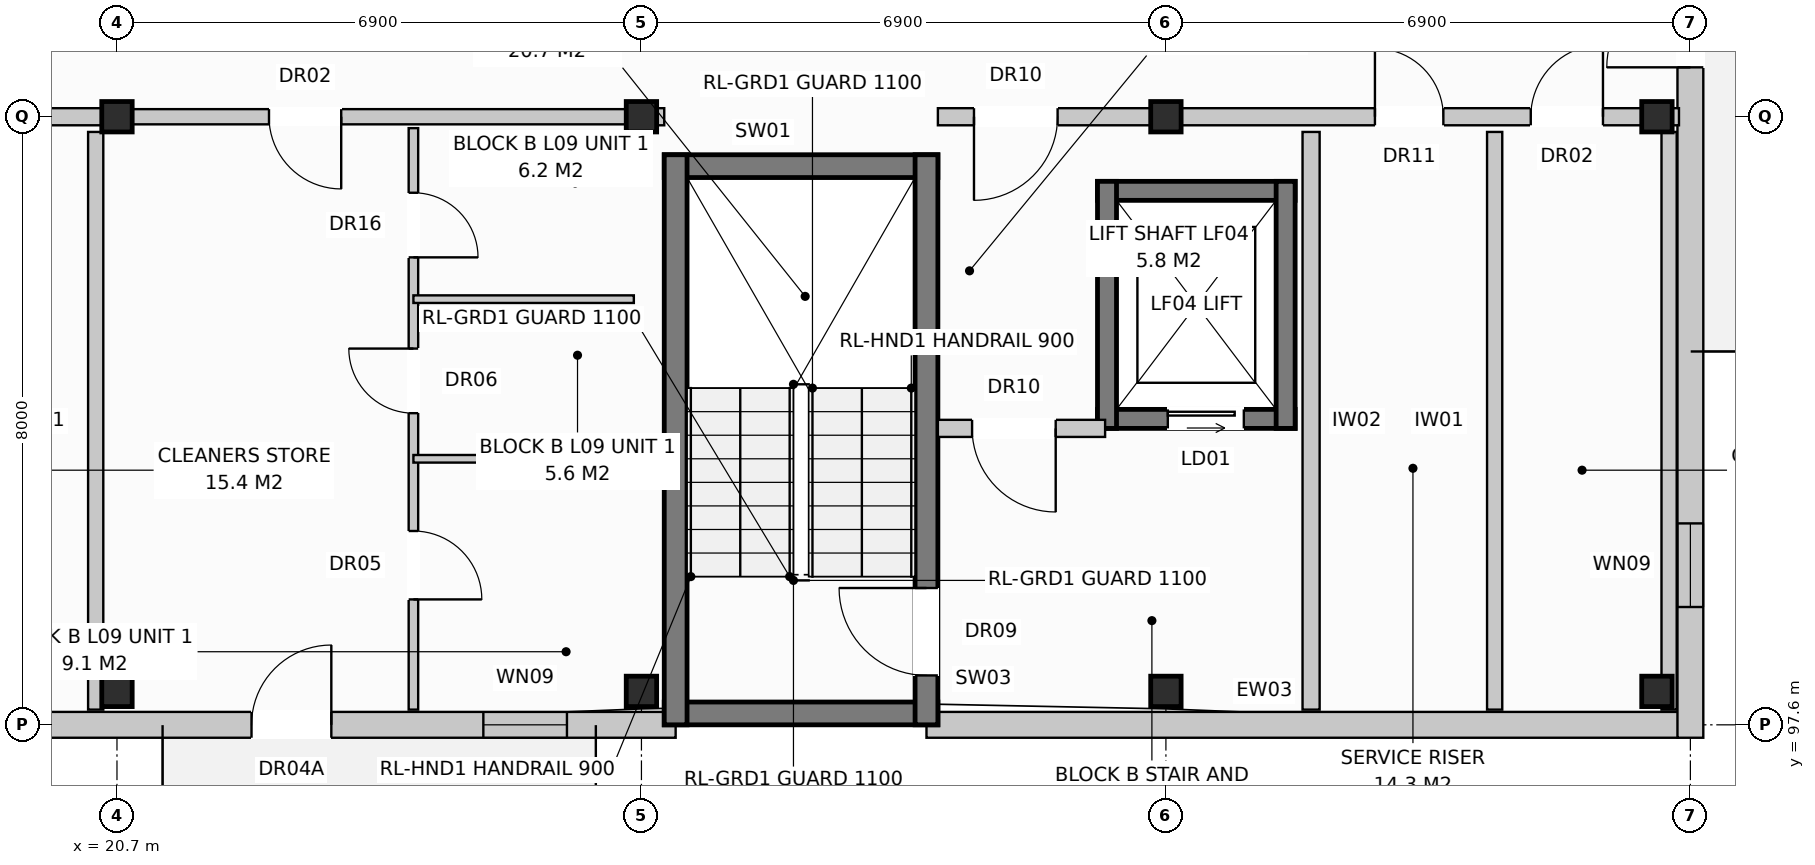
"""IFC4 building model, lengths in metres.
Left out: names, types, materials, properties, quantities, classifications, styles, units other than length and angle.
Written with IfcOpenShell. Run it as: python <this file> out.ifc"""

import sys

from ifc_helpers import new_model, si_unit, direction, frame, frame_2d, origin, origin_with_axes, origin_2d, place, context, subcontext, project, spatial, rectangle, extrude, element, fill, save


model = new_model("IFC4")
c1 = context("Model", 3, precision=1e-05, world=origin(), true_north=direction((0.0, 1.0)))
c2 = subcontext(c1, "Body", "Model", "MODEL_VIEW")
j1 = project(units=[si_unit("LENGTHUNIT", "METRE"), si_unit("PLANEANGLEUNIT", "RADIAN")], contexts=[c1])
p1 = place(None, origin())
s1 = spatial("IfcSite", under=j1, at=p1, CompositionType="ELEMENT")
p2 = place(p1, origin())
s2 = spatial("IfcBuilding", under=s1, at=p2, CompositionType="ELEMENT")
p3 = place(p2, frame((0.0, 0.0, 30.4)))
s3 = spatial("IfcBuildingStorey", under=s2, at=p3, CompositionType="ELEMENT", Elevation=30.4)
for number, where, z_axis, x_axis in (
    (1, (20.7, 98.04, 0.0), (0.0, 0.0, 1.0), (1.0, 0.0, 0.0)),
    (2, (20.7, 105.6, 0.0), (0.0, 0.0, 1.0), (1.0, 0.0, 0.0)),
    (3, (27.6, 98.04, 0.0), (0.0, 0.0, 1.0), (1.0, 0.0, 0.0)),
    (4, (27.6, 105.6, 0.0), (0.0, 0.0, 1.0), (1.0, 0.0, 0.0)),
    (5, (34.5, 98.04, 0.0), (0.0, 0.0, 1.0), (1.0, 0.0, 0.0)),
    (6, (34.5, 105.6, 0.0), (0.0, 0.0, 1.0), (1.0, 0.0, 0.0)),
    (7, (40.96, 98.04, 0.0), (0.0, 0.0, 1.0), (1.0, 0.0, 0.0)),
    (8, (40.96, 105.6, 0.0), (0.0, 0.0, 1.0), (1.0, 0.0, 0.0)),
):
    element("IfcColumn", number, at=place(p3, frame(where, z_axis=z_axis, x_axis=x_axis)), inside=s3, PredefinedType="COLUMN", context=c2, shape_type="SweptSolid", body=[
        extrude(rectangle(XDim=0.4, YDim=0.4, at=origin_2d()), origin(), (0.0, 0.0, 1.0), 3.2),
    ])
p4 = place(p3, frame((10.65, 97.6, 0.0), z_axis=(0.0, 0.0, 1.0), x_axis=(1.0, 0.0, 0.0)))
e9 = element("IfcWall", 9, at=p4, inside=s3, PredefinedType="STANDARD", context=c2, shape_type="SweptSolid", body=[
    extrude(rectangle(XDim=17.4, YDim=0.34, at=frame_2d((8.7, 0.0))), origin(), (0.0, 0.0, 1.0), 2.96),
])
p5 = place(p4, frame((11.82, 0.0, 0.0)))
e10 = element("IfcOpeningElement", 10, at=p5, cuts=e9, PredefinedType="OPENING", context=c2, shape_type="SweptSolid", body=[
    extrude(rectangle(XDim=1.05, YDim=2.12, at=frame_2d((0.525, 1.06))), frame((0.0, 0.182, 0.0), z_axis=(0.0, -1.0, 0.0), x_axis=(1.0, 0.0, 0.0)), (0.0, 0.0, 1.0), 0.364),
])
p6 = place(p4, frame((14.87, 0.0, 0.72)))
e11 = element("IfcOpeningElement", 11, at=p6, cuts=e9, PredefinedType="OPENING", context=c2, shape_type="SweptSolid", body=[
    extrude(rectangle(XDim=1.1, YDim=1.5, at=frame_2d((0.55, 0.75))), frame((0.0, 0.182, 0.0), z_axis=(0.0, -1.0, 0.0), x_axis=(1.0, 0.0, 0.0)), (0.0, 0.0, 1.0), 0.364),
])
p7 = place(p3, frame((31.35, 97.6, 0.0), z_axis=(0.0, 0.0, 1.0), x_axis=(1.0, 0.0, 0.0)))
e12 = element("IfcWall", 12, at=p7, inside=s3, PredefinedType="STANDARD", context=c2, shape_type="SweptSolid", body=[
    extrude(rectangle(XDim=9.89, YDim=0.34, at=frame_2d((4.945, 0.0))), origin(), (0.0, 0.0, 1.0), 2.96),
])
p8 = place(p3, frame((41.4, 97.43, 0.0), z_axis=(0.0, 0.0, 1.0), x_axis=(0.0, 1.0, 0.0)))
e13 = element("IfcWall", 13, at=p8, inside=s3, PredefinedType="STANDARD", context=c2, shape_type="SweptSolid", body=[
    extrude(rectangle(XDim=18.74, YDim=0.34, at=frame_2d((9.37, 0.0))), origin(), (0.0, 0.0, 1.0), 2.96),
])
p9 = place(p8, frame((8.82, 0.0, 0.0)))
e14 = element("IfcOpeningElement", 14, at=p9, cuts=e13, PredefinedType="OPENING", context=c2, shape_type="SweptSolid", body=[
    extrude(rectangle(XDim=1.1, YDim=2.1, at=frame_2d((0.55, 1.05))), frame((0.0, 0.182, 0.0), z_axis=(0.0, -1.0, 0.0), x_axis=(1.0, 0.0, 0.0)), (0.0, 0.0, 1.0), 0.364),
])
p10 = place(p8, frame((1.72, 0.0, 0.72)))
e15 = element("IfcOpeningElement", 15, at=p10, cuts=e13, PredefinedType="OPENING", context=c2, shape_type="SweptSolid", body=[
    extrude(rectangle(XDim=1.1, YDim=1.5, at=frame_2d((0.55, 0.75))), frame((0.0, 0.182, 0.0), z_axis=(0.0, -1.0, 0.0), x_axis=(1.0, 0.0, 0.0)), (0.0, 0.0, 1.0), 0.364),
])
p11 = place(p8, frame((15.92, 0.0, 0.72)))
e16 = element("IfcOpeningElement", 16, at=p11, cuts=e13, PredefinedType="OPENING", context=c2, shape_type="SweptSolid", body=[
    extrude(rectangle(XDim=1.1, YDim=1.5, at=frame_2d((0.55, 0.75))), frame((0.0, 0.182, 0.0), z_axis=(0.0, -1.0, 0.0), x_axis=(1.0, 0.0, 0.0)), (0.0, 0.0, 1.0), 0.364),
])
p12 = place(p3, frame((20.42, 97.8, 0.0), z_axis=(0.0, 0.0, 1.0), x_axis=(0.0, 1.0, 0.0)))
e17 = element("IfcWall", 17, at=p12, inside=s3, PredefinedType="PARTITIONING", context=c2, shape_type="SweptSolid", body=[
    extrude(rectangle(XDim=7.6, YDim=0.2, at=frame_2d((3.8, 0.0))), origin(), (0.0, 0.0, 1.0), 2.96),
])
p13 = place(p3, frame((10.8, 105.6, 0.0), z_axis=(0.0, 0.0, 1.0), x_axis=(1.0, 0.0, 0.0)))
e18 = element("IfcWall", 18, at=p13, inside=s3, PredefinedType="PARTITIONING", context=c2, shape_type="SweptSolid", body=[
    extrude(rectangle(XDim=9.9, YDim=0.225, at=frame_2d((4.95, 0.0))), origin(), (0.0, 0.0, 1.0), 2.4),
])
p14 = place(p13, frame((0.475, 0.0, 0.0)))
e19 = element("IfcOpeningElement", 19, at=p14, cuts=e18, PredefinedType="OPENING", context=c2, shape_type="SweptSolid", body=[
    extrude(rectangle(XDim=1.1, YDim=2.15, at=frame_2d((0.55, 1.075))), frame((0.0, 0.125, 0.0), z_axis=(0.0, -1.0, 0.0), x_axis=(1.0, 0.0, 0.0)), (0.0, 0.0, 1.0), 0.249),
])
p15 = place(p13, frame((5.75, 0.0, 0.0)))
e20 = element("IfcOpeningElement", 20, at=p15, cuts=e18, PredefinedType="OPENING", context=c2, shape_type="SweptSolid", body=[
    extrude(rectangle(XDim=0.9, YDim=2.1, at=frame_2d((0.45, 1.05))), frame((0.0, 0.125, 0.0), z_axis=(0.0, -1.0, 0.0), x_axis=(1.0, 0.0, 0.0)), (0.0, 0.0, 1.0), 0.249),
])
p16 = place(p13, frame((7.8, 0.0, 0.0)))
e21 = element("IfcOpeningElement", 21, at=p16, cuts=e18, PredefinedType="OPENING", context=c2, shape_type="SweptSolid", body=[
    extrude(rectangle(XDim=0.95, YDim=2.15, at=frame_2d((0.475, 1.075))), frame((0.0, 0.125, 0.0), z_axis=(0.0, -1.0, 0.0), x_axis=(1.0, 0.0, 0.0)), (0.0, 0.0, 1.0), 0.249),
])
for number, where, z_axis, x_axis in (
    (22, (27.9, 97.75, 0.0), (0.0, 0.0, 1.0), (1.0, 0.0, 0.0)),
    (23, (27.9, 104.95, 0.0), (0.0, 0.0, 1.0), (1.0, 0.0, 0.0)),
):
    element("IfcWall", number, at=place(p3, frame(where, z_axis=z_axis, x_axis=x_axis)), inside=s3, PredefinedType="SHEAR", context=c2, shape_type="SweptSolid", body=[
        extrude(rectangle(XDim=3.6, YDim=0.3, at=frame_2d((1.8, 0.0))), origin(), (0.0, 0.0, 1.0), 2.96),
    ])
p17 = place(p3, frame((28.05, 97.6, 0.0), z_axis=(0.0, 0.0, 1.0), x_axis=(0.0, 1.0, 0.0)))
e24 = element("IfcWall", 24, at=p17, inside=s3, PredefinedType="SHEAR", context=c2, shape_type="SweptSolid", body=[
    extrude(rectangle(XDim=7.5, YDim=0.3, at=frame_2d((3.75, 0.0))), origin(), (0.0, 0.0, 1.0), 2.96),
])
p18 = place(p3, frame((31.35, 97.6, 0.0), z_axis=(0.0, 0.0, 1.0), x_axis=(0.0, 1.0, 0.0)))
e25 = element("IfcWall", 25, at=p18, inside=s3, PredefinedType="SHEAR", context=c2, shape_type="SweptSolid", body=[
    extrude(rectangle(XDim=7.5, YDim=0.3, at=frame_2d((3.75, 0.0))), origin(), (0.0, 0.0, 1.0), 2.96),
])
p19 = place(p18, frame((0.65, 0.0, 0.0)))
e26 = element("IfcOpeningElement", 26, at=p19, cuts=e25, PredefinedType="OPENING", context=c2, shape_type="SweptSolid", body=[
    extrude(rectangle(XDim=1.15, YDim=2.15, at=frame_2d((0.575, 1.075))), frame((0.0, 0.162, 0.0), z_axis=(0.0, -1.0, 0.0), x_axis=(1.0, 0.0, 0.0)), (0.0, 0.0, 1.0), 0.324),
])
p20 = place(p3, frame((33.6, 101.625, 0.0), z_axis=(0.0, 0.0, 1.0), x_axis=(1.0, 0.0, 0.0)))
e27 = element("IfcWall", 27, at=p20, inside=s3, PredefinedType="SHEAR", context=c2, shape_type="SweptSolid", body=[
    extrude(rectangle(XDim=2.6, YDim=0.25, at=frame_2d((1.3, 0.0))), origin(), (0.0, 0.0, 1.0), 2.96),
])
p21 = place(p20, frame((0.925, 0.0, 0.0)))
e28 = element("IfcOpeningElement", 28, at=p21, cuts=e27, PredefinedType="OPENING", context=c2, shape_type="SweptSolid", body=[
    extrude(rectangle(XDim=1.0, YDim=2.1, at=frame_2d((0.5, 1.05))), frame((0.0, 0.137, 0.0), z_axis=(0.0, -1.0, 0.0), x_axis=(1.0, 0.0, 0.0)), (0.0, 0.0, 1.0), 0.274),
])
p22 = place(p3, frame((33.6, 104.625, 0.0), z_axis=(0.0, 0.0, 1.0), x_axis=(1.0, 0.0, 0.0)))
e29 = element("IfcWall", 29, at=p22, inside=s3, PredefinedType="SHEAR", context=c2, shape_type="SweptSolid", body=[
    extrude(rectangle(XDim=2.6, YDim=0.25, at=frame_2d((1.3, 0.0))), origin(), (0.0, 0.0, 1.0), 2.96),
])
for number, where, z_axis, x_axis in (
    (30, (33.725, 101.5, 0.0), (0.0, 0.0, 1.0), (0.0, 1.0, 0.0)),
    (31, (36.075, 101.5, 0.0), (0.0, 0.0, 1.0), (0.0, 1.0, 0.0)),
):
    element("IfcWall", number, at=place(p3, frame(where, z_axis=z_axis, x_axis=x_axis)), inside=s3, PredefinedType="SHEAR", context=c2, shape_type="SweptSolid", body=[
        extrude(rectangle(XDim=3.25, YDim=0.25, at=frame_2d((1.625, 0.0))), origin(), (0.0, 0.0, 1.0), 2.96),
    ])
p23 = place(p3, frame((36.41, 97.8, 0.0), z_axis=(0.0, 0.0, 1.0), x_axis=(0.0, 1.0, 0.0)))
e32 = element("IfcWall", 32, at=p23, inside=s3, PredefinedType="PARTITIONING", context=c2, shape_type="SweptSolid", body=[
    extrude(rectangle(XDim=7.6, YDim=0.225, at=frame_2d((3.8, 0.0))), origin(), (0.0, 0.0, 1.0), 2.59),
])
p24 = place(p3, frame((31.5, 101.5, 0.0), z_axis=(0.0, 0.0, 1.0), x_axis=(1.0, 0.0, 0.0)))
e33 = element("IfcWall", 33, at=p24, inside=s3, PredefinedType="PARTITIONING", context=c2, shape_type="SweptSolid", body=[
    extrude(rectangle(XDim=2.2, YDim=0.225, at=frame_2d((1.1, 0.0))), origin(), (0.0, 0.0, 1.0), 2.96),
])
p25 = place(p24, frame((0.45, 0.0, 0.0)))
e34 = element("IfcOpeningElement", 34, at=p25, cuts=e33, PredefinedType="OPENING", context=c2, shape_type="SweptSolid", body=[
    extrude(rectangle(XDim=1.1, YDim=2.15, at=frame_2d((0.55, 1.075))), frame((0.0, 0.125, 0.0), z_axis=(0.0, -1.0, 0.0), x_axis=(1.0, 0.0, 0.0)), (0.0, 0.0, 1.0), 0.249),
])
p26 = place(p3, frame((27.6, 105.6, 0.0), z_axis=(0.0, 0.0, 1.0), x_axis=(1.0, 0.0, 0.0)))
e35 = element("IfcWall", 35, at=p26, inside=s3, PredefinedType="PARTITIONING", context=c2, shape_type="SweptSolid", body=[
    extrude(rectangle(XDim=0.3, YDim=0.225, at=frame_2d((0.15, 0.0))), origin(), (0.0, 0.0, 1.0), 2.96),
])
p27 = place(p3, frame((38.825, 97.8, 0.0), z_axis=(0.0, 0.0, 1.0), x_axis=(0.0, 1.0, 0.0)))
e36 = element("IfcWall", 36, at=p27, inside=s3, PredefinedType="PARTITIONING", context=c2, shape_type="SweptSolid", body=[
    extrude(rectangle(XDim=7.6, YDim=0.2, at=frame_2d((3.8, 0.0))), origin(), (0.0, 0.0, 1.0), 2.59),
])
p28 = place(p3, frame((41.12, 97.8, 0.0), z_axis=(0.0, 0.0, 1.0), x_axis=(0.0, 1.0, 0.0)))
e37 = element("IfcWall", 37, at=p28, inside=s3, PredefinedType="PARTITIONING", context=c2, shape_type="SweptSolid", body=[
    extrude(rectangle(XDim=7.6, YDim=0.2, at=frame_2d((3.8, 0.0))), origin(), (0.0, 0.0, 1.0), 2.4),
])
p29 = place(p3, frame((31.5, 105.6, 0.0), z_axis=(0.0, 0.0, 1.0), x_axis=(1.0, 0.0, 0.0)))
e38 = element("IfcWall", 38, at=p29, inside=s3, PredefinedType="PARTITIONING", context=c2, shape_type="SweptSolid", body=[
    extrude(rectangle(XDim=9.75, YDim=0.225, at=frame_2d((4.875, 0.0))), origin(), (0.0, 0.0, 1.0), 2.4),
])
p30 = place(p29, frame((0.475, 0.0, 0.0)))
e39 = element("IfcOpeningElement", 39, at=p30, cuts=e38, PredefinedType="OPENING", context=c2, shape_type="SweptSolid", body=[
    extrude(rectangle(XDim=1.1, YDim=2.15, at=frame_2d((0.55, 1.075))), frame((0.0, 0.125, 0.0), z_axis=(0.0, -1.0, 0.0), x_axis=(1.0, 0.0, 0.0)), (0.0, 0.0, 1.0), 0.249),
])
p31 = place(p29, frame((5.75, 0.0, 0.0)))
e40 = element("IfcOpeningElement", 40, at=p31, cuts=e38, PredefinedType="OPENING", context=c2, shape_type="SweptSolid", body=[
    extrude(rectangle(XDim=0.9, YDim=2.1, at=frame_2d((0.45, 1.05))), frame((0.0, 0.125, 0.0), z_axis=(0.0, -1.0, 0.0), x_axis=(1.0, 0.0, 0.0)), (0.0, 0.0, 1.0), 0.249),
])
p32 = place(p29, frame((7.8, 0.0, 0.0)))
e41 = element("IfcOpeningElement", 41, at=p32, cuts=e38, PredefinedType="OPENING", context=c2, shape_type="SweptSolid", body=[
    extrude(rectangle(XDim=0.95, YDim=2.15, at=frame_2d((0.475, 1.075))), frame((0.0, 0.125, 0.0), z_axis=(0.0, -1.0, 0.0), x_axis=(1.0, 0.0, 0.0)), (0.0, 0.0, 1.0), 0.249),
])
p33 = place(p3, frame((20.7, 105.6, 0.0), z_axis=(0.0, 0.0, 1.0), x_axis=(1.0, 0.0, 0.0)))
e42 = element("IfcWall", 42, at=p33, inside=s3, PredefinedType="PARTITIONING", context=c2, shape_type="SweptSolid", body=[
    extrude(rectangle(XDim=6.9, YDim=0.2, at=frame_2d((3.45, 0.0))), origin(), (0.0, 0.0, 1.0), 2.4),
])
p34 = place(p33, frame((2.0, 0.0, 0.0)))
e43 = element("IfcOpeningElement", 43, at=p34, cuts=e42, PredefinedType="OPENING", context=c2, shape_type="SweptSolid", body=[
    extrude(rectangle(XDim=0.95, YDim=2.15, at=frame_2d((0.475, 1.075))), frame((0.0, 0.112, 0.0), z_axis=(0.0, -1.0, 0.0), x_axis=(1.0, 0.0, 0.0)), (0.0, 0.0, 1.0), 0.224),
])
p35 = place(p3, frame((24.6, 105.45, 0.0), z_axis=(0.0, 0.0, 1.0), x_axis=(0.0, -1.0, 0.0)))
e44 = element("IfcWall", 44, at=p35, inside=s3, PredefinedType="PARTITIONING", context=c2, shape_type="SweptSolid", body=[
    extrude(rectangle(XDim=7.65, YDim=0.125, at=frame_2d((3.825, 0.0))), origin(), (0.0, 0.0, 1.0), 2.96),
])
p36 = place(p35, frame((0.85, 0.0, 0.0)))
e45 = element("IfcOpeningElement", 45, at=p36, cuts=e44, PredefinedType="OPENING", context=c2, shape_type="SweptSolid", body=[
    extrude(rectangle(XDim=0.85, YDim=2.1, at=frame_2d((0.425, 1.05))), frame((0.0, 0.074, 0.0), z_axis=(0.0, -1.0, 0.0), x_axis=(1.0, 0.0, 0.0)), (0.0, 0.0, 1.0), 0.149),
])
p37 = place(p35, frame((2.9, 0.0, 0.0)))
e46 = element("IfcOpeningElement", 46, at=p37, cuts=e44, PredefinedType="OPENING", context=c2, shape_type="SweptSolid", body=[
    extrude(rectangle(XDim=0.85, YDim=2.05, at=frame_2d((0.425, 1.025))), frame((0.0, 0.074, 0.0), z_axis=(0.0, -1.0, 0.0), x_axis=(1.0, 0.0, 0.0)), (0.0, 0.0, 1.0), 0.149),
])
p38 = place(p35, frame((5.3, 0.0, 0.0)))
e47 = element("IfcOpeningElement", 47, at=p38, cuts=e44, PredefinedType="OPENING", context=c2, shape_type="SweptSolid", body=[
    extrude(rectangle(XDim=0.9, YDim=2.1, at=frame_2d((0.45, 1.05))), frame((0.0, 0.074, 0.0), z_axis=(0.0, -1.0, 0.0), x_axis=(1.0, 0.0, 0.0)), (0.0, 0.0, 1.0), 0.149),
])
for number, where, z_axis, x_axis in (
    (48, (24.6, 103.2, 0.0), (0.0, 0.0, 1.0), (1.0, 0.0, 0.0)),
    (49, (24.6, 101.1, 0.0), (0.0, 0.0, 1.0), (1.0, 0.0, 0.0)),
):
    element("IfcWall", number, at=place(p3, frame(where, z_axis=z_axis, x_axis=x_axis)), inside=s3, PredefinedType="PARTITIONING", context=c2, shape_type="SweptSolid", body=[
        extrude(rectangle(XDim=2.9, YDim=0.1, at=frame_2d((1.45, 0.0))), origin(), (0.0, 0.0, 1.0), 2.96),
    ])
p39 = place(p5, origin_with_axes())
e50 = element("IfcDoor", 50, at=p39, inside=s3, OperationType="SINGLE_SWING_RIGHT", PredefinedType="DOOR", context=c2, shape_type="SweptSolid", body=[
    extrude(rectangle(XDim=1.05, YDim=2.12, at=frame_2d((0.525, 1.06))), frame((0.0, 0.025, 0.0), z_axis=(0.0, -1.0, 0.0), x_axis=(1.0, 0.0, 0.0)), (0.0, 0.0, 1.0), 0.05),
])
fill(e10, e50)
p40 = place(p6, origin_with_axes())
e51 = element("IfcWindow", 51, at=p40, inside=s3, PartitioningType="SINGLE_PANEL", PredefinedType="WINDOW", context=c2, shape_type="SweptSolid", body=[
    extrude(rectangle(XDim=1.1, YDim=1.5, at=frame_2d((0.55, 0.75))), frame((0.0, 0.03, 0.0), z_axis=(0.0, -1.0, 0.0), x_axis=(1.0, 0.0, 0.0)), (0.0, 0.0, 1.0), 0.06),
])
fill(e11, e51)
p41 = place(p9, origin_with_axes())
e52 = element("IfcDoor", 52, at=p41, inside=s3, OperationType="SINGLE_SWING_LEFT", PredefinedType="DOOR", context=c2, shape_type="SweptSolid", body=[
    extrude(rectangle(XDim=1.1, YDim=2.1, at=frame_2d((0.55, 1.05))), frame((0.0, 0.025, 0.0), z_axis=(0.0, -1.0, 0.0), x_axis=(1.0, 0.0, 0.0)), (0.0, 0.0, 1.0), 0.05),
])
fill(e14, e52)
p42 = place(p10, origin_with_axes())
e53 = element("IfcWindow", 53, at=p42, inside=s3, PartitioningType="SINGLE_PANEL", PredefinedType="WINDOW", context=c2, shape_type="SweptSolid", body=[
    extrude(rectangle(XDim=1.1, YDim=1.5, at=frame_2d((0.55, 0.75))), frame((0.0, 0.03, 0.0), z_axis=(0.0, -1.0, 0.0), x_axis=(1.0, 0.0, 0.0)), (0.0, 0.0, 1.0), 0.06),
])
fill(e15, e53)
p43 = place(p19, origin_with_axes())
e54 = element("IfcDoor", 54, at=p43, inside=s3, OperationType="SINGLE_SWING_RIGHT", PredefinedType="DOOR", context=c2, shape_type="SweptSolid", body=[
    extrude(rectangle(XDim=1.15, YDim=2.15, at=frame_2d((0.575, 1.075))), frame((0.0, 0.025, 0.0), z_axis=(0.0, -1.0, 0.0), x_axis=(1.0, 0.0, 0.0)), (0.0, 0.0, 1.0), 0.05),
])
fill(e26, e54)
p44 = place(p21, origin_with_axes())
e55 = element("IfcDoor", 55, at=p44, inside=s3, OperationType="SLIDING_TO_LEFT", PredefinedType="DOOR", context=c2, shape_type="SweptSolid", body=[
    extrude(rectangle(XDim=1.0, YDim=2.1, at=frame_2d((0.5, 1.05))), frame((0.0, 0.025, 0.0), z_axis=(0.0, -1.0, 0.0), x_axis=(1.0, 0.0, 0.0)), (0.0, 0.0, 1.0), 0.05),
])
fill(e28, e55)
p45 = place(p25, frame((1.1, 0.0, 0.0), z_axis=(0.0, 0.0, 1.0), x_axis=(-1.0, 0.0, 0.0)))
e56 = element("IfcDoor", 56, at=p45, inside=s3, OperationType="SINGLE_SWING_RIGHT", PredefinedType="DOOR", context=c2, shape_type="SweptSolid", body=[
    extrude(rectangle(XDim=1.1, YDim=2.15, at=frame_2d((0.55, 1.075))), frame((0.0, 0.025, 0.0), z_axis=(0.0, -1.0, 0.0), x_axis=(1.0, 0.0, 0.0)), (0.0, 0.0, 1.0), 0.05),
])
fill(e34, e56)
p46 = place(p30, frame((1.1, 0.0, 0.0), z_axis=(0.0, 0.0, 1.0), x_axis=(-1.0, 0.0, 0.0)))
e57 = element("IfcDoor", 57, at=p46, inside=s3, OperationType="SINGLE_SWING_LEFT", PredefinedType="DOOR", context=c2, shape_type="SweptSolid", body=[
    extrude(rectangle(XDim=1.1, YDim=2.15, at=frame_2d((0.55, 1.075))), frame((0.0, 0.025, 0.0), z_axis=(0.0, -1.0, 0.0), x_axis=(1.0, 0.0, 0.0)), (0.0, 0.0, 1.0), 0.05),
])
fill(e39, e57)
p47 = place(p31, origin_with_axes())
e58 = element("IfcDoor", 58, at=p47, inside=s3, OperationType="SINGLE_SWING_LEFT", PredefinedType="DOOR", context=c2, shape_type="SweptSolid", body=[
    extrude(rectangle(XDim=0.9, YDim=2.1, at=frame_2d((0.45, 1.05))), frame((0.0, 0.025, 0.0), z_axis=(0.0, -1.0, 0.0), x_axis=(1.0, 0.0, 0.0)), (0.0, 0.0, 1.0), 0.05),
])
fill(e40, e58)
p48 = place(p32, origin_with_axes())
e59 = element("IfcDoor", 59, at=p48, inside=s3, OperationType="SINGLE_SWING_RIGHT", PredefinedType="DOOR", context=c2, shape_type="SweptSolid", body=[
    extrude(rectangle(XDim=0.95, YDim=2.15, at=frame_2d((0.475, 1.075))), frame((0.0, 0.025, 0.0), z_axis=(0.0, -1.0, 0.0), x_axis=(1.0, 0.0, 0.0)), (0.0, 0.0, 1.0), 0.05),
])
fill(e41, e59)
p49 = place(p34, frame((0.95, 0.0, 0.0), z_axis=(0.0, 0.0, 1.0), x_axis=(-1.0, 0.0, 0.0)))
e60 = element("IfcDoor", 60, at=p49, inside=s3, OperationType="SINGLE_SWING_RIGHT", PredefinedType="DOOR", context=c2, shape_type="SweptSolid", body=[
    extrude(rectangle(XDim=0.95, YDim=2.15, at=frame_2d((0.475, 1.075))), frame((0.0, 0.025, 0.0), z_axis=(0.0, -1.0, 0.0), x_axis=(1.0, 0.0, 0.0)), (0.0, 0.0, 1.0), 0.05),
])
fill(e43, e60)
p50 = place(p36, origin_with_axes())
e61 = element("IfcDoor", 61, at=p50, inside=s3, OperationType="SINGLE_SWING_RIGHT", PredefinedType="DOOR", context=c2, shape_type="SweptSolid", body=[
    extrude(rectangle(XDim=0.85, YDim=2.1, at=frame_2d((0.425, 1.05))), frame((0.0, 0.025, 0.0), z_axis=(0.0, -1.0, 0.0), x_axis=(1.0, 0.0, 0.0)), (0.0, 0.0, 1.0), 0.05),
])
fill(e45, e61)
p51 = place(p37, frame((0.85, 0.0, 0.0), z_axis=(0.0, 0.0, 1.0), x_axis=(-1.0, 0.0, 0.0)))
e62 = element("IfcDoor", 62, at=p51, inside=s3, OperationType="SINGLE_SWING_LEFT", PredefinedType="DOOR", context=c2, shape_type="SweptSolid", body=[
    extrude(rectangle(XDim=0.85, YDim=2.05, at=frame_2d((0.425, 1.025))), frame((0.0, 0.025, 0.0), z_axis=(0.0, -1.0, 0.0), x_axis=(1.0, 0.0, 0.0)), (0.0, 0.0, 1.0), 0.05),
])
fill(e46, e62)
p52 = place(p38, origin_with_axes())
e63 = element("IfcDoor", 63, at=p52, inside=s3, OperationType="SINGLE_SWING_RIGHT", PredefinedType="DOOR", context=c2, shape_type="SweptSolid", body=[
    extrude(rectangle(XDim=0.9, YDim=2.1, at=frame_2d((0.45, 1.05))), frame((0.0, 0.025, 0.0), z_axis=(0.0, -1.0, 0.0), x_axis=(1.0, 0.0, 0.0)), (0.0, 0.0, 1.0), 0.05),
])
fill(e47, e63)
save(model, sys.argv[1])
